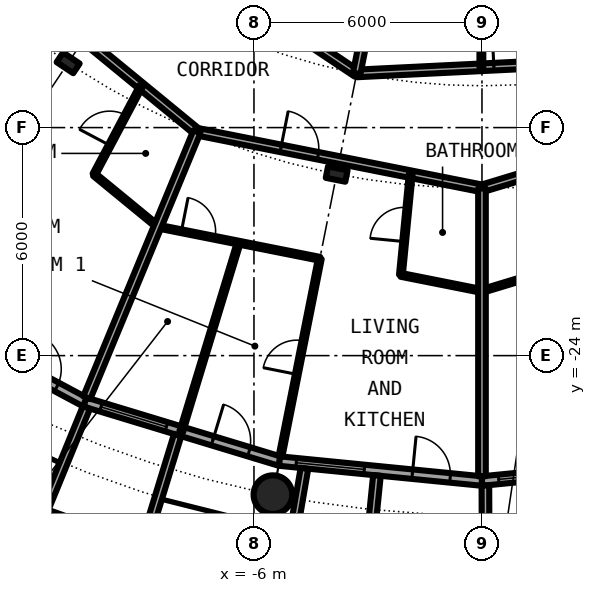
"""IFC4 building model, lengths in metres.
Left out: names, types, materials, properties, quantities, classifications, styles, units other than length and angle.
Written with IfcOpenShell. Run it as: python <this file> out.ifc"""

import sys

from ifc_helpers import new_model, si_unit, direction, frame, frame_2d, origin, origin_2d, place, context, subcontext, project, spatial, rectangle, circle, hollow_circle, i_section, extrude, element, fill, save


model = new_model("IFC4")
c1 = context("Model", 3, precision=1e-05, world=origin(), true_north=direction((0.0, 1.0)))
c2 = subcontext(c1, "Body", "Model", "MODEL_VIEW")
j1 = project(units=[si_unit("LENGTHUNIT", "METRE"), si_unit("PLANEANGLEUNIT", "RADIAN")], contexts=[c1])
p1 = place(None, origin())
s1 = spatial("IfcSite", under=j1, at=p1, CompositionType="ELEMENT")
p2 = place(p1, origin())
s2 = spatial("IfcBuilding", under=s1, at=p2, CompositionType="ELEMENT")
p3 = place(p2, frame((0.0, 0.0, 91.05)))
s3 = spatial("IfcBuildingStorey", under=s2, at=p3, CompositionType="ELEMENT", Elevation=91.05)
p4 = place(p3, frame((-5.501, -27.658, 0.0), z_axis=(0.0, 0.0, 1.0), x_axis=(1.0, 0.0, 0.0)))
e1 = element("IfcColumn", 1, at=p4, inside=s3, PredefinedType="COLUMN", context=c2, shape_type="SweptSolid", body=[
    extrude(hollow_circle(Radius=0.508, WallThickness=0.04, at=origin_2d()), origin(), (0.0, 0.0, 1.0), 3.05),
])
for number, where, z_axis, x_axis in (
    (2, (-10.889, -16.297, 0.0), (0.0, 0.0, 1.0), (-0.556, -0.831, 0.0)),
    (3, (-3.824, -19.223, 0.0), (0.0, 0.0, 1.0), (-0.195, -0.981, 0.0)),
):
    element("IfcColumn", number, at=place(p3, frame(where, z_axis=z_axis, x_axis=x_axis)), inside=s3, PredefinedType="COLUMN", context=c2, shape_type="SweptSolid", body=[
        extrude(i_section(OverallWidth=0.306, OverallDepth=0.524, WebThickness=0.021, FlangeThickness=0.04, FilletRadius=0.027, at=origin_2d()), origin(), (0.0, 0.0, 1.0), 3.05),
    ])
p5 = place(p3, frame((-15.167, -22.699, 0.0), z_axis=(0.0, 0.0, 1.0), x_axis=(0.881915646801, -0.471407246368, 0.0)))
e4 = element("IfcWall", 4, at=p5, inside=s3, PredefinedType="SOLIDWALL", context=c2, shape_type="SweptSolid", body=[
    extrude(rectangle(XDim=5.352, YDim=0.25, at=frame_2d((2.676, 0.0))), origin(), (0.0, 0.0, 1.0), 2.7),
])
p6 = place(p5, frame((0.441, 0.0, 0.3)))
e5 = element("IfcOpeningElement", 5, at=p6, cuts=e4, PredefinedType="OPENING", context=c2, shape_type="SweptSolid", body=[
    extrude(rectangle(XDim=1.8, YDim=2.1, at=frame_2d((0.9, 1.05))), frame((0.0, 0.135, 0.0), z_axis=(0.0, -1.0, 0.0), x_axis=(1.0, 0.0, 0.0)), (0.0, 0.0, 1.0), 0.27),
])
p7 = place(p5, frame((3.51, 0.0, 0.0)))
e6 = element("IfcOpeningElement", 6, at=p7, cuts=e4, PredefinedType="OPENING", context=c2, shape_type="SweptSolid", body=[
    extrude(rectangle(XDim=1.0, YDim=2.2, at=frame_2d((0.5, 1.1))), frame((0.0, 0.135, 0.0), z_axis=(0.0, -1.0, 0.0), x_axis=(1.0, 0.0, 0.0)), (0.0, 0.0, 1.0), 0.27),
])
p8 = place(p3, frame((-10.447, -25.222, 0.0), z_axis=(0.0, 0.0, 1.0), x_axis=(0.956965678721, -0.290201119486, 0.0)))
e7 = element("IfcWall", 7, at=p8, inside=s3, PredefinedType="SOLIDWALL", context=c2, shape_type="SweptSolid", body=[
    extrude(rectangle(XDim=5.351, YDim=0.25, at=frame_2d((2.676, 0.0))), origin(), (0.0, 0.0, 1.0), 2.7),
])
p9 = place(p8, frame((0.441, 0.0, 0.3)))
e8 = element("IfcOpeningElement", 8, at=p9, cuts=e7, PredefinedType="OPENING", context=c2, shape_type="SweptSolid", body=[
    extrude(rectangle(XDim=1.8, YDim=2.1, at=frame_2d((0.9, 1.05))), frame((0.0, 0.135, 0.0), z_axis=(0.0, -1.0, 0.0), x_axis=(1.0, 0.0, 0.0)), (0.0, 0.0, 1.0), 0.27),
])
p10 = place(p8, frame((3.51, 0.0, 0.0)))
e9 = element("IfcOpeningElement", 9, at=p10, cuts=e7, PredefinedType="OPENING", context=c2, shape_type="SweptSolid", body=[
    extrude(rectangle(XDim=1.0, YDim=2.2, at=frame_2d((0.5, 1.1))), frame((0.0, 0.135, 0.0), z_axis=(0.0, -1.0, 0.0), x_axis=(1.0, 0.0, 0.0)), (0.0, 0.0, 1.0), 0.27),
])
p11 = place(p3, frame((-11.638, -28.084, -0.03), z_axis=(0.0, 0.0, 1.0), x_axis=(0.941461077774, -0.337121697664, 0.0)))
e10 = element("IfcWall", 10, at=p11, inside=s3, PredefinedType="SOLIDWALL", context=c2, shape_type="SweptSolid", body=[
    extrude(rectangle(XDim=2.993, YDim=0.2, at=frame_2d((1.497, 0.0))), origin(), (0.0, 0.0, 1.0), 2.73),
])
p12 = place(p11, frame((0.457, 0.0, 0.33)))
e11 = element("IfcOpeningElement", 11, at=p12, cuts=e10, PredefinedType="OPENING", context=c2, shape_type="SweptSolid", body=[
    extrude(circle(Radius=1.04, at=frame_2d((1.04, 1.04))), frame((0.0, 0.11, 0.0), z_axis=(0.0, -1.0, 0.0), x_axis=(1.0, 0.0, 0.0)), (0.0, 0.0, 1.0), 0.22),
])
p13 = place(p3, frame((-10.409, -25.364, -0.03), z_axis=(0.0, 0.0, 1.0), x_axis=(-0.379509886562, -0.925187681501, 0.0)))
e12 = element("IfcWall", 12, at=p13, inside=s3, PredefinedType="SOLIDWALL", context=c2, shape_type="SweptSolid", body=[
    extrude(rectangle(XDim=2.883, YDim=0.2, at=frame_2d((1.441, 0.0))), origin(), (0.0, 0.0, 1.0), 2.73),
])
p14 = place(p3, frame((-8.009, -26.092, -0.03), z_axis=(0.0, 0.0, 1.0), x_axis=(-0.293406695073, -0.955987715029, 0.0)))
e13 = element("IfcWall", 13, at=p14, inside=s3, PredefinedType="SOLIDWALL", context=c2, shape_type="SweptSolid", body=[
    extrude(rectangle(XDim=3.006, YDim=0.2, at=frame_2d((1.503, 0.0))), origin(), (0.0, 0.0, 1.0), 2.73),
])
p15 = place(p3, frame((-5.326, -26.775, 0.0), z_axis=(0.0, 0.0, 1.0), x_axis=(0.995173996315, -0.098126026407, 0.0)))
e14 = element("IfcWall", 14, at=p15, inside=s3, PredefinedType="SOLIDWALL", context=c2, shape_type="SweptSolid", body=[
    extrude(rectangle(XDim=5.352, YDim=0.25, at=frame_2d((2.676, 0.0))), origin(), (0.0, 0.0, 1.0), 2.7),
])
p16 = place(p15, frame((0.441, 0.0, 0.3)))
e15 = element("IfcOpeningElement", 15, at=p16, cuts=e14, PredefinedType="OPENING", context=c2, shape_type="SweptSolid", body=[
    extrude(rectangle(XDim=1.8, YDim=2.1, at=frame_2d((0.9, 1.05))), frame((0.0, 0.135, 0.0), z_axis=(0.0, -1.0, 0.0), x_axis=(1.0, 0.0, 0.0)), (0.0, 0.0, 1.0), 0.27),
])
p17 = place(p15, frame((3.51, 0.0, 0.0)))
e16 = element("IfcOpeningElement", 16, at=p17, cuts=e14, PredefinedType="OPENING", context=c2, shape_type="SweptSolid", body=[
    extrude(rectangle(XDim=1.0, YDim=2.2, at=frame_2d((0.5, 1.1))), frame((0.0, 0.135, 0.0), z_axis=(0.0, -1.0, 0.0), x_axis=(1.0, 0.0, 0.0)), (0.0, 0.0, 1.0), 0.27),
])
p18 = place(p3, frame((-4.671, -26.966, -0.03), z_axis=(0.0, 0.0, 1.0), x_axis=(-0.170539878907, -0.985350774954, 0.0)))
e17 = element("IfcWall", 17, at=p18, inside=s3, PredefinedType="SOLIDWALL", context=c2, shape_type="SweptSolid", body=[
    extrude(rectangle(XDim=2.932, YDim=0.2, at=frame_2d((1.466, 0.0))), origin(), (0.0, 0.0, 1.0), 2.73),
])
p19 = place(p3, frame((-2.764, -27.153, -0.03), z_axis=(0.0, 0.0, 1.0), x_axis=(-0.101505487237, -0.994834979311, 0.0)))
e18 = element("IfcWall", 18, at=p19, inside=s3, PredefinedType="SOLIDWALL", context=c2, shape_type="SweptSolid", body=[
    extrude(rectangle(XDim=3.007, YDim=0.2, at=frame_2d((1.503, 0.0))), origin(), (0.0, 0.0, 1.0), 2.73),
])
p20 = place(p3, frame((0.0, -27.3, 0.0), z_axis=(0.0, 0.0, 1.0), x_axis=(0.995173996315, 0.098126026407, 0.0)))
e19 = element("IfcWall", 19, at=p20, inside=s3, PredefinedType="SOLIDWALL", context=c2, shape_type="SweptSolid", body=[
    extrude(rectangle(XDim=5.352, YDim=0.25, at=frame_2d((2.676, 0.0))), origin(), (0.0, 0.0, 1.0), 2.7),
])
p21 = place(p20, frame((0.441, 0.0, 0.3)))
e20 = element("IfcOpeningElement", 20, at=p21, cuts=e19, PredefinedType="OPENING", context=c2, shape_type="SweptSolid", body=[
    extrude(rectangle(XDim=1.8, YDim=2.1, at=frame_2d((0.9, 1.05))), frame((0.0, 0.135, 0.0), z_axis=(0.0, -1.0, 0.0), x_axis=(1.0, 0.0, 0.0)), (0.0, 0.0, 1.0), 0.27),
])
p22 = place(p20, frame((3.51, 0.0, 0.0)))
e21 = element("IfcOpeningElement", 21, at=p22, cuts=e19, PredefinedType="OPENING", context=c2, shape_type="SweptSolid", body=[
    extrude(rectangle(XDim=1.0, YDim=2.2, at=frame_2d((0.5, 1.1))), frame((0.0, 0.135, 0.0), z_axis=(0.0, -1.0, 0.0), x_axis=(1.0, 0.0, 0.0)), (0.0, 0.0, 1.0), 0.27),
])
p23 = place(p3, frame((0.09, -27.417, -0.03), z_axis=(0.0, 0.0, 1.0), x_axis=(0.00347308367, -0.999993968827, 0.0)))
e22 = element("IfcWall", 22, at=p23, inside=s3, PredefinedType="SOLIDWALL", context=c2, shape_type="SweptSolid", body=[
    extrude(rectangle(XDim=2.882, YDim=0.2, at=frame_2d((1.441, 0.0))), origin(), (0.0, 0.0, 1.0), 2.73),
])
p24 = place(p3, frame((-8.536, -20.603, 0.0), z_axis=(0.0, 0.0, 1.0), x_axis=(0.980795826794, -0.195037294239, 0.0)))
e23 = element("IfcWall", 23, at=p24, inside=s3, PredefinedType="PARTITIONING", context=c2, shape_type="SweptSolid", body=[
    extrude(rectangle(XDim=4.352, YDim=0.1, at=frame_2d((2.176, 0.0))), origin(), (0.0, 0.0, 1.0), 2.7),
])
p25 = place(p24, frame((0.639, 0.0, 0.0)))
e24 = element("IfcOpeningElement", 24, at=p25, cuts=e23, PredefinedType="OPENING", context=c2, shape_type="SweptSolid", body=[
    extrude(rectangle(XDim=0.9, YDim=2.3, at=frame_2d((0.45, 1.15))), frame((0.0, 0.06, 0.0), z_axis=(0.0, -1.0, 0.0), x_axis=(1.0, 0.0, 0.0)), (0.0, 0.0, 1.0), 0.12),
])
p26 = place(p3, frame((-2.133, -21.876, 0.0), z_axis=(0.0, 0.0, 1.0), x_axis=(0.980804550577, -0.194993419292, 0.0)))
e25 = element("IfcWall", 25, at=p26, inside=s3, PredefinedType="PARTITIONING", context=c2, shape_type="SweptSolid", body=[
    extrude(rectangle(XDim=2.175, YDim=0.1, at=frame_2d((1.087, 0.0))), origin(), (0.0, 0.0, 1.0), 2.7),
])
p27 = place(p3, frame((-10.202, -19.234, 0.0), z_axis=(0.0, 0.0, 1.0), x_axis=(0.772948171844, -0.634469166818, 0.0)))
e26 = element("IfcWall", 26, at=p27, inside=s3, PredefinedType="PARTITIONING", context=c2, shape_type="SweptSolid", body=[
    extrude(rectangle(XDim=2.158, YDim=0.1, at=frame_2d((1.079, 0.0))), origin(), (0.0, 0.0, 1.0), 2.7),
])
p28 = place(p3, frame((0.0, -22.3, 0.0), z_axis=(0.0, 0.0, 1.0), x_axis=(0.956940987612, 0.290282528286, 0.0)))
e27 = element("IfcWall", 27, at=p28, inside=s3, PredefinedType="PARTITIONING", context=c2, shape_type="SweptSolid", body=[
    extrude(rectangle(XDim=6.477, YDim=0.1, at=frame_2d((3.238, 0.0))), origin(), (0.0, 0.0, 1.0), 2.7),
])
p29 = place(p3, frame((-7.501, -18.108, 0.0), z_axis=(0.0, 0.0, 1.0), x_axis=(0.980781515054, -0.195109250749, 0.0)))
e28 = element("IfcWall", 28, at=p29, inside=s3, PredefinedType="PARTITIONING", context=c2, shape_type="SweptSolid", body=[
    extrude(rectangle(XDim=7.648, YDim=0.2, at=frame_2d((3.824, 0.0))), origin(), (0.0, 0.0, 1.0), 2.38),
])
p30 = place(p29, frame((2.25, 0.0, 0.0)))
e29 = element("IfcOpeningElement", 29, at=p30, cuts=e28, PredefinedType="OPENING", context=c2, shape_type="SweptSolid", body=[
    extrude(rectangle(XDim=1.0, YDim=2.3, at=frame_2d((0.5, 1.15))), frame((0.0, 0.11, 0.0), z_axis=(0.0, -1.0, 0.0), x_axis=(1.0, 0.0, 0.0)), (0.0, 0.0, 1.0), 0.22),
])
p31 = place(p3, frame((-16.173, -10.991, 0.0), z_axis=(0.0, 0.0, 1.0), x_axis=(0.773013989296, -0.634388975591, 0.0)))
e30 = element("IfcWall", 30, at=p31, inside=s3, PredefinedType="PARTITIONING", context=c2, shape_type="SweptSolid", body=[
    extrude(rectangle(XDim=11.219, YDim=0.2, at=frame_2d((5.609, 0.0))), origin(), (0.0, 0.0, 1.0), 2.38),
])
p32 = place(p31, frame((6.278, 0.0, 0.0)))
e31 = element("IfcOpeningElement", 31, at=p32, cuts=e30, PredefinedType="OPENING", context=c2, shape_type="SweptSolid", body=[
    extrude(rectangle(XDim=1.0, YDim=2.3, at=frame_2d((0.5, 1.15))), frame((0.0, 0.11, 0.0), z_axis=(0.0, -1.0, 0.0), x_axis=(1.0, 0.0, 0.0)), (0.0, 0.0, 1.0), 0.22),
])
p33 = place(p3, frame((0.0, -19.6, 0.0), z_axis=(0.0, 0.0, 1.0), x_axis=(0.956932298225, 0.290311172044, 0.0)))
e32 = element("IfcWall", 32, at=p33, inside=s3, PredefinedType="PARTITIONING", context=c2, shape_type="SweptSolid", body=[
    extrude(rectangle(XDim=11.219, YDim=0.2, at=frame_2d((5.61, 0.0))), origin(), (0.0, 0.0, 1.0), 2.38),
])
p34 = place(p33, frame((7.086, 0.0, 0.0)))
e33 = element("IfcOpeningElement", 33, at=p34, cuts=e32, PredefinedType="OPENING", context=c2, shape_type="SweptSolid", body=[
    extrude(rectangle(XDim=1.0, YDim=2.3, at=frame_2d((0.5, 1.15))), frame((0.0, 0.11, 0.0), z_axis=(0.0, -1.0, 0.0), x_axis=(1.0, 0.0, 0.0)), (0.0, 0.0, 1.0), 0.22),
])
p35 = place(p3, frame((-3.297, -16.575, 0.0), z_axis=(0.0, 0.0, 1.0), x_axis=(0.998796706656, 0.0490422142, 0.0)))
e34 = element("IfcWall", 34, at=p35, inside=s3, PredefinedType="PARTITIONING", context=c2, shape_type="SweptSolid", body=[
    extrude(rectangle(XDim=8.214, YDim=0.2, at=frame_2d((4.107, 0.0))), origin(), (0.0, 0.0, 1.0), 2.7),
])
p36 = place(p35, frame((3.614, 0.0, 0.0)))
e35 = element("IfcOpeningElement", 35, at=p36, cuts=e34, PredefinedType="OPENING", context=c2, shape_type="SweptSolid", body=[
    extrude(rectangle(XDim=1.0, YDim=2.3, at=frame_2d((0.5, 1.15))), frame((0.0, 0.11, 0.0), z_axis=(0.0, -1.0, 0.0), x_axis=(1.0, 0.0, 0.0)), (0.0, 0.0, 1.0), 0.22),
])
p37 = place(p3, frame((-12.706, -10.291, 0.0), z_axis=(0.0, 0.0, 1.0), x_axis=(0.831588572532, -0.555392155178, 0.0)))
e36 = element("IfcWall", 36, at=p37, inside=s3, PredefinedType="PARTITIONING", context=c2, shape_type="SweptSolid", body=[
    extrude(rectangle(XDim=11.314, YDim=0.2, at=frame_2d((5.657, 0.0))), origin(), (0.0, 0.0, 1.0), 2.7),
])
p38 = place(p37, frame((5.966, 0.0, 0.0)))
e37 = element("IfcOpeningElement", 37, at=p38, cuts=e36, PredefinedType="OPENING", context=c2, shape_type="SweptSolid", body=[
    extrude(rectangle(XDim=1.0, YDim=2.3, at=frame_2d((0.5, 1.15))), frame((0.0, 0.11, 0.0), z_axis=(0.0, -1.0, 0.0), x_axis=(1.0, 0.0, 0.0)), (0.0, 0.0, 1.0), 0.22),
])
p39 = place(p3, frame((-10.399, -25.106, 0.0), z_axis=(0.0, 0.0, 1.0), x_axis=(0.382600411313, 0.923913916587, 0.0)))
e38 = element("IfcWall", 38, at=p39, inside=s3, PredefinedType="PARTITIONING", context=c2, shape_type="SweptSolid", body=[
    extrude(rectangle(XDim=7.574, YDim=0.2, at=frame_2d((3.787, 0.0))), origin(), (0.0, 0.0, 1.0), 2.7),
])
p40 = place(p3, frame((-10.202, -19.234, 0.0), z_axis=(0.0, 0.0, 1.0), x_axis=(0.468462103808, 0.883483591979, 0.0)))
e39 = element("IfcWall", 39, at=p40, inside=s3, PredefinedType="PARTITIONING", context=c2, shape_type="SweptSolid", body=[
    extrude(rectangle(XDim=2.636, YDim=0.1, at=frame_2d((1.318, 0.0))), origin(), (0.0, 0.0, 1.0), 2.7),
])
p41 = place(p40, frame((0.868, 0.0, 0.0)))
e40 = element("IfcOpeningElement", 40, at=p41, cuts=e39, PredefinedType="OPENING", context=c2, shape_type="SweptSolid", body=[
    extrude(rectangle(XDim=0.9, YDim=2.3, at=frame_2d((0.45, 1.15))), frame((0.0, 0.06, 0.0), z_axis=(0.0, -1.0, 0.0), x_axis=(1.0, 0.0, 0.0)), (0.0, 0.0, 1.0), 0.12),
])
p42 = place(p3, frame((-7.913, -25.997, 0.0), z_axis=(0.0, 0.0, 1.0), x_axis=(0.291264462755, 0.956642573136, 0.0)))
e41 = element("IfcWall", 41, at=p42, inside=s3, PredefinedType="PARTITIONING", context=c2, shape_type="SweptSolid", body=[
    extrude(rectangle(XDim=5.195, YDim=0.1, at=frame_2d((2.598, 0.0))), origin(), (0.0, 0.0, 1.0), 2.7),
])
p43 = place(p3, frame((-5.302, -26.653, 0.0), z_axis=(0.0, 0.0, 1.0), x_axis=(0.195115793364, 0.980780213493, 0.0)))
e42 = element("IfcWall", 42, at=p43, inside=s3, PredefinedType="PARTITIONING", context=c2, shape_type="SweptSolid", body=[
    extrude(rectangle(XDim=5.304, YDim=0.1, at=frame_2d((2.652, 0.0))), origin(), (0.0, 0.0, 1.0), 2.7),
])
p44 = place(p43, frame((2.202, 0.0, 0.0)))
e43 = element("IfcOpeningElement", 43, at=p44, cuts=e42, PredefinedType="OPENING", context=c2, shape_type="SweptSolid", body=[
    extrude(rectangle(XDim=0.9, YDim=2.3, at=frame_2d((0.45, 1.15))), frame((0.0, 0.06, 0.0), z_axis=(0.0, -1.0, 0.0), x_axis=(1.0, 0.0, 0.0)), (0.0, 0.0, 1.0), 0.12),
])
p45 = place(p3, frame((-3.297, -16.575, 0.0), z_axis=(0.0, 0.0, 1.0), x_axis=(0.19511354088, 0.980780661598, 0.0)))
e44 = element("IfcWall", 44, at=p45, inside=s3, PredefinedType="PARTITIONING", context=c2, shape_type="SweptSolid", body=[
    extrude(rectangle(XDim=9.179, YDim=0.2, at=frame_2d((4.59, 0.0))), origin(), (0.0, 0.0, 1.0), 2.7),
])
p46 = place(p3, frame((-2.133, -21.876, 0.0), z_axis=(0.0, 0.0, 1.0), x_axis=(0.096960338807, 0.995288246036, 0.0)))
e45 = element("IfcWall", 45, at=p46, inside=s3, PredefinedType="PARTITIONING", context=c2, shape_type="SweptSolid", body=[
    extrude(rectangle(XDim=2.661, YDim=0.1, at=frame_2d((1.331, 0.0))), origin(), (0.0, 0.0, 1.0), 2.7),
])
p47 = place(p46, frame((0.881, 0.0, 0.0)))
e46 = element("IfcOpeningElement", 46, at=p47, cuts=e45, PredefinedType="OPENING", context=c2, shape_type="SweptSolid", body=[
    extrude(rectangle(XDim=0.9, YDim=2.3, at=frame_2d((0.45, 1.15))), frame((0.0, 0.06, 0.0), z_axis=(0.0, -1.0, 0.0), x_axis=(1.0, 0.0, 0.0)), (0.0, 0.0, 1.0), 0.12),
])
p48 = place(p3, frame((-0.016, -16.414, 0.0), z_axis=(0.0, 0.0, 1.0), x_axis=(0.001210427419, 0.999999267432, 0.0)))
e47 = element("IfcWall", 47, at=p48, inside=s3, PredefinedType="PARTITIONING", context=c2, shape_type="SweptSolid", body=[
    extrude(rectangle(XDim=2.622, YDim=0.1, at=frame_2d((1.311, 0.0))), origin(), (0.0, 0.0, 1.0), 2.7),
])
p49 = place(p3, frame((0.0, -27.175, 0.0), z_axis=(0.0, 0.0, 1.0), x_axis=(0.0, 1.0, 0.0)))
e48 = element("IfcWall", 48, at=p49, inside=s3, PredefinedType="PARTITIONING", context=c2, shape_type="SweptSolid", body=[
    extrude(rectangle(XDim=7.575, YDim=0.2, at=frame_2d((3.788, 0.0))), origin(), (0.0, 0.0, 1.0), 2.7),
])
p50 = place(p7, origin())
e49 = element("IfcDoor", 49, at=p50, inside=s3, OperationType="SINGLE_SWING_LEFT", PredefinedType="DOOR", context=c2, shape_type="SweptSolid", body=[
    extrude(rectangle(XDim=1.0, YDim=2.2, at=frame_2d((0.5, 1.1))), frame((0.0, 0.025, 0.0), z_axis=(0.0, -1.0, 0.0), x_axis=(1.0, 0.0, 0.0)), (0.0, 0.0, 1.0), 0.05),
])
fill(e6, e49)
p51 = place(p9, origin())
e50 = element("IfcWindow", 50, at=p51, inside=s3, PartitioningType="SINGLE_PANEL", PredefinedType="WINDOW", context=c2, shape_type="SweptSolid", body=[
    extrude(rectangle(XDim=1.8, YDim=2.1, at=frame_2d((0.9, 1.05))), frame((0.0, 0.03, 0.0), z_axis=(0.0, -1.0, 0.0), x_axis=(1.0, 0.0, 0.0)), (0.0, 0.0, 1.0), 0.06),
])
fill(e8, e50)
p52 = place(p10, origin())
e51 = element("IfcDoor", 51, at=p52, inside=s3, OperationType="SINGLE_SWING_LEFT", PredefinedType="DOOR", context=c2, shape_type="SweptSolid", body=[
    extrude(rectangle(XDim=1.0, YDim=2.2, at=frame_2d((0.5, 1.1))), frame((0.0, 0.025, 0.0), z_axis=(0.0, -1.0, 0.0), x_axis=(1.0, 0.0, 0.0)), (0.0, 0.0, 1.0), 0.05),
])
fill(e9, e51)
p53 = place(p16, origin())
e52 = element("IfcWindow", 52, at=p53, inside=s3, PartitioningType="SINGLE_PANEL", PredefinedType="WINDOW", context=c2, shape_type="SweptSolid", body=[
    extrude(rectangle(XDim=1.8, YDim=2.1, at=frame_2d((0.9, 1.05))), frame((0.0, 0.03, 0.0), z_axis=(0.0, -1.0, 0.0), x_axis=(1.0, 0.0, 0.0)), (0.0, 0.0, 1.0), 0.06),
])
fill(e15, e52)
p54 = place(p17, origin())
e53 = element("IfcDoor", 53, at=p54, inside=s3, OperationType="SINGLE_SWING_LEFT", PredefinedType="DOOR", context=c2, shape_type="SweptSolid", body=[
    extrude(rectangle(XDim=1.0, YDim=2.2, at=frame_2d((0.5, 1.1))), frame((0.0, 0.025, 0.0), z_axis=(0.0, -1.0, 0.0), x_axis=(1.0, 0.0, 0.0)), (0.0, 0.0, 1.0), 0.05),
])
fill(e16, e53)
p55 = place(p21, origin())
e54 = element("IfcWindow", 54, at=p55, inside=s3, PartitioningType="SINGLE_PANEL", PredefinedType="WINDOW", context=c2, shape_type="SweptSolid", body=[
    extrude(rectangle(XDim=1.8, YDim=2.1, at=frame_2d((0.9, 1.05))), frame((0.0, 0.03, 0.0), z_axis=(0.0, -1.0, 0.0), x_axis=(1.0, 0.0, 0.0)), (0.0, 0.0, 1.0), 0.06),
])
fill(e20, e54)
p56 = place(p41, origin())
e55 = element("IfcDoor", 55, at=p56, inside=s3, OperationType="SINGLE_SWING_RIGHT", PredefinedType="DOOR", context=c2, shape_type="SweptSolid", body=[
    extrude(rectangle(XDim=0.9, YDim=2.3, at=frame_2d((0.45, 1.15))), frame((0.0, 0.025, 0.0), z_axis=(0.0, -1.0, 0.0), x_axis=(1.0, 0.0, 0.0)), (0.0, 0.0, 1.0), 0.05),
])
fill(e40, e55)
p57 = place(p30, origin())
e56 = element("IfcDoor", 56, at=p57, inside=s3, OperationType="SINGLE_SWING_LEFT", PredefinedType="DOOR", context=c2, shape_type="SweptSolid", body=[
    extrude(rectangle(XDim=1.0, YDim=2.3, at=frame_2d((0.5, 1.15))), frame((0.0, 0.025, 0.0), z_axis=(0.0, -1.0, 0.0), x_axis=(1.0, 0.0, 0.0)), (0.0, 0.0, 1.0), 0.05),
])
fill(e29, e56)
p58 = place(p47, origin())
e57 = element("IfcDoor", 57, at=p58, inside=s3, OperationType="SINGLE_SWING_LEFT", PredefinedType="DOOR", context=c2, shape_type="SweptSolid", body=[
    extrude(rectangle(XDim=0.9, YDim=2.3, at=frame_2d((0.45, 1.15))), frame((0.0, 0.025, 0.0), z_axis=(0.0, -1.0, 0.0), x_axis=(1.0, 0.0, 0.0)), (0.0, 0.0, 1.0), 0.05),
])
fill(e46, e57)
p59 = place(p44, origin())
e58 = element("IfcDoor", 58, at=p59, inside=s3, OperationType="SINGLE_SWING_LEFT", PredefinedType="DOOR", context=c2, shape_type="SweptSolid", body=[
    extrude(rectangle(XDim=0.9, YDim=2.3, at=frame_2d((0.45, 1.15))), frame((0.0, 0.025, 0.0), z_axis=(0.0, -1.0, 0.0), x_axis=(1.0, 0.0, 0.0)), (0.0, 0.0, 1.0), 0.05),
])
fill(e43, e58)
p60 = place(p25, origin())
e59 = element("IfcDoor", 59, at=p60, inside=s3, OperationType="SINGLE_SWING_LEFT", PredefinedType="DOOR", context=c2, shape_type="SweptSolid", body=[
    extrude(rectangle(XDim=0.9, YDim=2.3, at=frame_2d((0.45, 1.15))), frame((0.0, 0.025, 0.0), z_axis=(0.0, -1.0, 0.0), x_axis=(1.0, 0.0, 0.0)), (0.0, 0.0, 1.0), 0.05),
])
fill(e24, e59)
p61 = place(p36, origin())
e60 = element("IfcDoor", 60, at=p61, inside=s3, OperationType="SINGLE_SWING_RIGHT", PredefinedType="DOOR", context=c2, shape_type="SweptSolid", body=[
    extrude(rectangle(XDim=1.0, YDim=2.3, at=frame_2d((0.5, 1.15))), frame((0.0, 0.025, 0.0), z_axis=(0.0, -1.0, 0.0), x_axis=(1.0, 0.0, 0.0)), (0.0, 0.0, 1.0), 0.05),
])
fill(e35, e60)
save(model, sys.argv[1])
